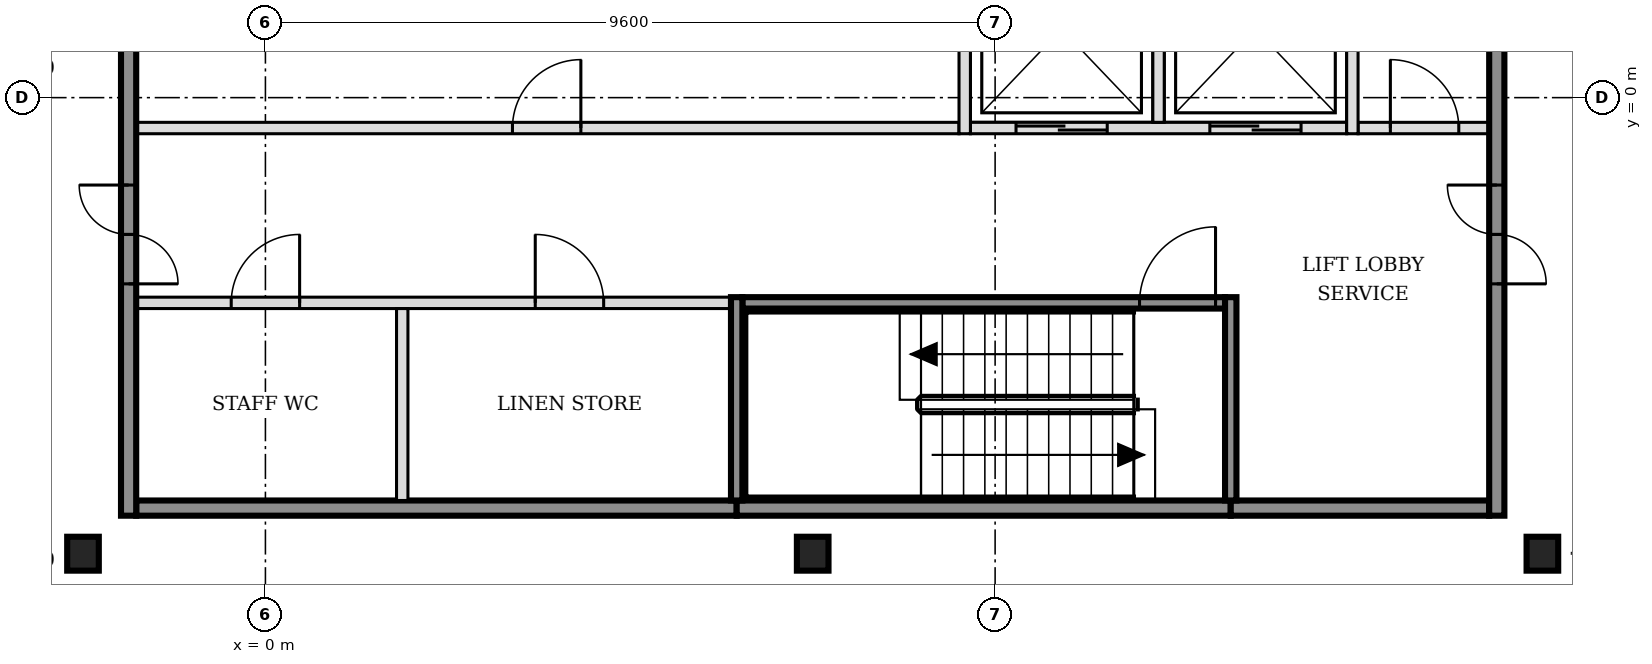
"""IFC4 building model, lengths in metres.
Left out: names, types, materials, properties, quantities, classifications, styles, units other than length and angle.
Written with IfcOpenShell. Run it as: python <this file> out.ifc"""

import sys

from ifc_helpers import new_model, si_unit, direction, frame, frame_2d, origin, origin_2d, place, context, subcontext, project, spatial, rectangle, i_section, extrude, element, fill, save


model = new_model("IFC4")
c1 = context("Model", 3, precision=1e-05, world=origin(), true_north=direction((0.0, 1.0)))
c2 = subcontext(c1, "Body", "Model", "MODEL_VIEW")
j1 = project(units=[si_unit("LENGTHUNIT", "METRE"), si_unit("PLANEANGLEUNIT", "RADIAN")], contexts=[c1])
p1 = place(None, origin())
s1 = spatial("IfcSite", under=j1, at=p1, CompositionType="ELEMENT")
p2 = place(p1, origin())
s2 = spatial("IfcBuilding", under=s1, at=p2, CompositionType="ELEMENT")
p3 = place(p2, frame((0.0, 0.0, 172.2)))
s3 = spatial("IfcBuildingStorey", under=s2, at=p3, CompositionType="ELEMENT", Elevation=172.2)
for number, where, z_axis, x_axis in (
    (1, (-2.4, -6.0, -0.15), (0.0, 0.0, 1.0), (1.0, 0.0, 0.0)),
    (2, (7.2, -6.0, -0.15), (0.0, 0.0, 1.0), (1.0, 0.0, 0.0)),
    (3, (16.8, -6.0, -0.15), (0.0, 0.0, 1.0), (1.0, 0.0, 0.0)),
):
    element("IfcColumn", number, at=place(p3, frame(where, z_axis=z_axis, x_axis=x_axis)), inside=s3, PredefinedType="COLUMN", context=c2, shape_type="SweptSolid", body=[
        extrude(i_section(OverallWidth=0.416, OverallDepth=0.446, WebThickness=0.039, FlangeThickness=0.063, FilletRadius=0.015, at=origin_2d()), origin(), (0.0, 0.0, 1.0), 3.6),
    ])
p4 = place(p3, frame((-1.7, -5.4, 0.0), z_axis=(0.0, 0.0, 1.0), x_axis=(1.0, 0.0, 0.0)))
e4 = element("IfcWall", 4, at=p4, inside=s3, PredefinedType="SOLIDWALL", context=c2, shape_type="SweptSolid", body=[
    extrude(rectangle(XDim=7.9, YDim=0.2, at=frame_2d((3.95, 0.0))), origin(), (0.0, 0.0, 1.0), 3.45),
])
p5 = place(p3, frame((6.2, -5.4, 0.0), z_axis=(0.0, 0.0, 1.0), x_axis=(1.0, 0.0, 0.0)))
e5 = element("IfcWall", 5, at=p5, inside=s3, PredefinedType="SOLIDWALL", context=c2, shape_type="SweptSolid", body=[
    extrude(rectangle(XDim=6.5, YDim=0.2, at=frame_2d((3.25, 0.0))), origin(), (0.0, 0.0, 1.0), 3.45),
])
p6 = place(p3, frame((12.7, -5.4, 0.0), z_axis=(0.0, 0.0, 1.0), x_axis=(1.0, 0.0, 0.0)))
e6 = element("IfcWall", 6, at=p6, inside=s3, PredefinedType="SOLIDWALL", context=c2, shape_type="SweptSolid", body=[
    extrude(rectangle(XDim=3.4, YDim=0.2, at=frame_2d((1.7, 0.0))), origin(), (0.0, 0.0, 1.0), 3.45),
])
p7 = place(p3, frame((-1.7, -2.7, 0.0), z_axis=(0.0, 0.0, 1.0), x_axis=(1.0, 0.0, 0.0)))
e7 = element("IfcWall", 7, at=p7, inside=s3, PredefinedType="PARTITIONING", context=c2, shape_type="SweptSolid", body=[
    extrude(rectangle(XDim=7.825, YDim=0.15, at=frame_2d((3.913, 0.0))), origin(), (0.0, 0.0, 1.0), 3.45),
])
p8 = place(p7, frame((1.25, 0.0, 0.0)))
e8 = element("IfcOpeningElement", 8, at=p8, cuts=e7, PredefinedType="OPENING", context=c2, shape_type="SweptSolid", body=[
    extrude(rectangle(XDim=0.9, YDim=2.1, at=frame_2d((0.45, 1.05))), frame((0.0, 0.085, 0.0), z_axis=(0.0, -1.0, 0.0), x_axis=(1.0, 0.0, 0.0)), (0.0, 0.0, 1.0), 0.17),
])
p9 = place(p7, frame((5.25, 0.0, 0.0)))
e9 = element("IfcOpeningElement", 9, at=p9, cuts=e7, PredefinedType="OPENING", context=c2, shape_type="SweptSolid", body=[
    extrude(rectangle(XDim=0.9, YDim=2.1, at=frame_2d((0.45, 1.05))), frame((0.0, 0.085, 0.0), z_axis=(0.0, -1.0, 0.0), x_axis=(1.0, 0.0, 0.0)), (0.0, 0.0, 1.0), 0.17),
])
p10 = place(p3, frame((6.275, -2.7, 0.0), z_axis=(0.0, 0.0, 1.0), x_axis=(1.0, 0.0, 0.0)))
e10 = element("IfcWall", 10, at=p10, inside=s3, PredefinedType="SOLIDWALL", context=c2, shape_type="SweptSolid", body=[
    extrude(rectangle(XDim=6.35, YDim=0.15, at=frame_2d((3.175, 0.0))), origin(), (0.0, 0.0, 1.0), 3.45),
])
p11 = place(p10, frame((5.225, 0.0, 0.0)))
e11 = element("IfcOpeningElement", 11, at=p11, cuts=e10, PredefinedType="OPENING", context=c2, shape_type="SweptSolid", body=[
    extrude(rectangle(XDim=1.0, YDim=2.1, at=frame_2d((0.5, 1.05))), frame((0.0, 0.085, 0.0), z_axis=(0.0, -1.0, 0.0), x_axis=(1.0, 0.0, 0.0)), (0.0, 0.0, 1.0), 0.17),
])
p12 = place(p3, frame((-1.7, -0.4, 0.0), z_axis=(0.0, 0.0, 1.0), x_axis=(1.0, 0.0, 0.0)))
e12 = element("IfcWall", 12, at=p12, inside=s3, PredefinedType="PARTITIONING", context=c2, shape_type="SweptSolid", body=[
    extrude(rectangle(XDim=10.825, YDim=0.15, at=frame_2d((5.413, 0.0))), origin(), (0.0, 0.0, 1.0), 3.45),
])
p13 = place(p12, frame((4.95, 0.0, 0.0)))
e13 = element("IfcOpeningElement", 13, at=p13, cuts=e12, PredefinedType="OPENING", context=c2, shape_type="SweptSolid", body=[
    extrude(rectangle(XDim=0.9, YDim=2.1, at=frame_2d((0.45, 1.05))), frame((0.0, 0.085, 0.0), z_axis=(0.0, -1.0, 0.0), x_axis=(1.0, 0.0, 0.0)), (0.0, 0.0, 1.0), 0.17),
])
p14 = place(p3, frame((9.275, -0.4, 0.0), z_axis=(0.0, 0.0, 1.0), x_axis=(1.0, 0.0, 0.0)))
e14 = element("IfcWall", 14, at=p14, inside=s3, PredefinedType="SOLIDWALL", context=c2, shape_type="SweptSolid", body=[
    extrude(rectangle(XDim=4.95, YDim=0.15, at=frame_2d((2.475, 0.0))), origin(), (0.0, 0.0, 1.0), 3.45),
])
p15 = place(p14, frame((0.6, 0.0, 0.0)))
e15 = element("IfcOpeningElement", 15, at=p15, cuts=e14, PredefinedType="OPENING", context=c2, shape_type="SweptSolid", body=[
    extrude(rectangle(XDim=1.2, YDim=2.1, at=frame_2d((0.6, 1.05))), frame((0.0, 0.085, 0.0), z_axis=(0.0, -1.0, 0.0), x_axis=(1.0, 0.0, 0.0)), (0.0, 0.0, 1.0), 0.17),
])
p16 = place(p14, frame((3.15, 0.0, 0.0)))
e16 = element("IfcOpeningElement", 16, at=p16, cuts=e14, PredefinedType="OPENING", context=c2, shape_type="SweptSolid", body=[
    extrude(rectangle(XDim=1.2, YDim=2.1, at=frame_2d((0.6, 1.05))), frame((0.0, 0.085, 0.0), z_axis=(0.0, -1.0, 0.0), x_axis=(1.0, 0.0, 0.0)), (0.0, 0.0, 1.0), 0.17),
])
p17 = place(p3, frame((14.375, -0.4, 0.0), z_axis=(0.0, 0.0, 1.0), x_axis=(1.0, 0.0, 0.0)))
e17 = element("IfcWall", 17, at=p17, inside=s3, PredefinedType="PARTITIONING", context=c2, shape_type="SweptSolid", body=[
    extrude(rectangle(XDim=1.725, YDim=0.15, at=frame_2d((0.863, 0.0))), origin(), (0.0, 0.0, 1.0), 3.45),
])
p18 = place(p17, frame((0.425, 0.0, 0.0)))
e18 = element("IfcOpeningElement", 18, at=p18, cuts=e17, PredefinedType="OPENING", context=c2, shape_type="SweptSolid", body=[
    extrude(rectangle(XDim=0.9, YDim=2.1, at=frame_2d((0.45, 1.05))), frame((0.0, 0.085, 0.0), z_axis=(0.0, -1.0, 0.0), x_axis=(1.0, 0.0, 0.0)), (0.0, 0.0, 1.0), 0.17),
])
p19 = place(p3, frame((-1.8, -5.5, 0.0), z_axis=(0.0, 0.0, 1.0), x_axis=(0.0, 1.0, 0.0)))
e19 = element("IfcWall", 19, at=p19, inside=s3, PredefinedType="SOLIDWALL", context=c2, shape_type="SweptSolid", body=[
    extrude(rectangle(XDim=15.8, YDim=0.2, at=frame_2d((7.9, 0.0))), origin(), (0.0, 0.0, 1.0), 3.45),
])
p20 = place(p19, frame((3.05, 0.0, 0.0)))
e20 = element("IfcOpeningElement", 20, at=p20, cuts=e19, PredefinedType="OPENING", context=c2, shape_type="SweptSolid", body=[
    extrude(rectangle(XDim=1.3, YDim=2.1, at=frame_2d((0.65, 1.05))), frame((0.0, 0.11, 0.0), z_axis=(0.0, -1.0, 0.0), x_axis=(1.0, 0.0, 0.0)), (0.0, 0.0, 1.0), 0.22),
])
p21 = place(p19, frame((11.45, 0.0, 0.0)))
e21 = element("IfcOpeningElement", 21, at=p21, cuts=e19, PredefinedType="OPENING", context=c2, shape_type="SweptSolid", body=[
    extrude(rectangle(XDim=1.3, YDim=2.1, at=frame_2d((0.65, 1.05))), frame((0.0, 0.11, 0.0), z_axis=(0.0, -1.0, 0.0), x_axis=(1.0, 0.0, 0.0)), (0.0, 0.0, 1.0), 0.22),
])
p22 = place(p3, frame((1.8, -5.3, 0.0), z_axis=(0.0, 0.0, 1.0), x_axis=(0.0, 1.0, 0.0)))
e22 = element("IfcWall", 22, at=p22, inside=s3, PredefinedType="PARTITIONING", context=c2, shape_type="SweptSolid", body=[
    extrude(rectangle(XDim=2.525, YDim=0.15, at=frame_2d((1.263, 0.0))), origin(), (0.0, 0.0, 1.0), 3.45),
])
p23 = place(p3, frame((6.2, -5.3, 0.0), z_axis=(0.0, 0.0, 1.0), x_axis=(0.0, 1.0, 0.0)))
e23 = element("IfcWall", 23, at=p23, inside=s3, PredefinedType="SOLIDWALL", context=c2, shape_type="SweptSolid", body=[
    extrude(rectangle(XDim=2.675, YDim=0.15, at=frame_2d((1.337, 0.0))), origin(), (0.0, 0.0, 1.0), 3.45),
])
p24 = place(p3, frame((9.2, -0.475, 0.0), z_axis=(0.0, 0.0, 1.0), x_axis=(0.0, 1.0, 0.0)))
e24 = element("IfcWall", 24, at=p24, inside=s3, PredefinedType="SOLIDWALL", context=c2, shape_type="SweptSolid", body=[
    extrude(rectangle(XDim=2.6, YDim=0.15, at=frame_2d((1.3, 0.0))), origin(), (0.0, 0.0, 1.0), 3.45),
])
p25 = place(p3, frame((11.75, -0.325, 0.0), z_axis=(0.0, 0.0, 1.0), x_axis=(0.0, 1.0, 0.0)))
e25 = element("IfcWall", 25, at=p25, inside=s3, PredefinedType="SOLIDWALL", context=c2, shape_type="SweptSolid", body=[
    extrude(rectangle(XDim=2.45, YDim=0.15, at=frame_2d((1.225, 0.0))), origin(), (0.0, 0.0, 1.0), 3.45),
])
p26 = place(p3, frame((12.7, -5.3, 0.0), z_axis=(0.0, 0.0, 1.0), x_axis=(0.0, 1.0, 0.0)))
e26 = element("IfcWall", 26, at=p26, inside=s3, PredefinedType="SOLIDWALL", context=c2, shape_type="SweptSolid", body=[
    extrude(rectangle(XDim=2.675, YDim=0.15, at=frame_2d((1.337, 0.0))), origin(), (0.0, 0.0, 1.0), 3.45),
])
p27 = place(p3, frame((14.3, -0.475, 0.0), z_axis=(0.0, 0.0, 1.0), x_axis=(0.0, 1.0, 0.0)))
e27 = element("IfcWall", 27, at=p27, inside=s3, PredefinedType="SOLIDWALL", context=c2, shape_type="SweptSolid", body=[
    extrude(rectangle(XDim=2.75, YDim=0.15, at=frame_2d((1.375, 0.0))), origin(), (0.0, 0.0, 1.0), 3.45),
])
p28 = place(p3, frame((16.2, -5.5, 0.0), z_axis=(0.0, 0.0, 1.0), x_axis=(0.0, 1.0, 0.0)))
e28 = element("IfcWall", 28, at=p28, inside=s3, PredefinedType="SOLIDWALL", context=c2, shape_type="SweptSolid", body=[
    extrude(rectangle(XDim=15.8, YDim=0.2, at=frame_2d((7.9, 0.0))), origin(), (0.0, 0.0, 1.0), 3.45),
])
p29 = place(p28, frame((3.05, 0.0, 0.0)))
e29 = element("IfcOpeningElement", 29, at=p29, cuts=e28, PredefinedType="OPENING", context=c2, shape_type="SweptSolid", body=[
    extrude(rectangle(XDim=1.3, YDim=2.1, at=frame_2d((0.65, 1.05))), frame((0.0, 0.11, 0.0), z_axis=(0.0, -1.0, 0.0), x_axis=(1.0, 0.0, 0.0)), (0.0, 0.0, 1.0), 0.22),
])
p30 = place(p28, frame((11.45, 0.0, 0.0)))
e30 = element("IfcOpeningElement", 30, at=p30, cuts=e28, PredefinedType="OPENING", context=c2, shape_type="SweptSolid", body=[
    extrude(rectangle(XDim=1.3, YDim=2.1, at=frame_2d((0.65, 1.05))), frame((0.0, 0.11, 0.0), z_axis=(0.0, -1.0, 0.0), x_axis=(1.0, 0.0, 0.0)), (0.0, 0.0, 1.0), 0.22),
])
p31 = place(p15, origin())
e31 = element("IfcDoor", 31, at=p31, inside=s3, OperationType="DOUBLE_DOOR_SLIDING", PredefinedType="DOOR", context=c2, shape_type="SweptSolid", body=[
    extrude(rectangle(XDim=1.2, YDim=2.1, at=frame_2d((0.6, 1.05))), frame((0.0, 0.025, 0.0), z_axis=(0.0, -1.0, 0.0), x_axis=(1.0, 0.0, 0.0)), (0.0, 0.0, 1.0), 0.05),
])
fill(e15, e31)
p32 = place(p16, origin())
e32 = element("IfcDoor", 32, at=p32, inside=s3, OperationType="DOUBLE_DOOR_SLIDING", PredefinedType="DOOR", context=c2, shape_type="SweptSolid", body=[
    extrude(rectangle(XDim=1.2, YDim=2.1, at=frame_2d((0.6, 1.05))), frame((0.0, 0.025, 0.0), z_axis=(0.0, -1.0, 0.0), x_axis=(1.0, 0.0, 0.0)), (0.0, 0.0, 1.0), 0.05),
])
fill(e16, e32)
p33 = place(p11, origin())
e33 = element("IfcDoor", 33, at=p33, inside=s3, OperationType="SINGLE_SWING_RIGHT", PredefinedType="DOOR", context=c2, shape_type="SweptSolid", body=[
    extrude(rectangle(XDim=1.0, YDim=2.1, at=frame_2d((0.5, 1.05))), frame((0.0, 0.025, 0.0), z_axis=(0.0, -1.0, 0.0), x_axis=(1.0, 0.0, 0.0)), (0.0, 0.0, 1.0), 0.05),
])
fill(e11, e33)
p34 = place(p20, origin())
e34 = element("IfcDoor", 34, at=p34, inside=s3, OperationType="DOUBLE_DOOR_SINGLE_SWING", PredefinedType="DOOR", context=c2, shape_type="SweptSolid", body=[
    extrude(rectangle(XDim=1.3, YDim=2.1, at=frame_2d((0.65, 1.05))), frame((0.0, 0.025, 0.0), z_axis=(0.0, -1.0, 0.0), x_axis=(1.0, 0.0, 0.0)), (0.0, 0.0, 1.0), 0.05),
])
fill(e20, e34)
p35 = place(p29, origin())
e35 = element("IfcDoor", 35, at=p35, inside=s3, OperationType="DOUBLE_DOOR_SINGLE_SWING", PredefinedType="DOOR", context=c2, shape_type="SweptSolid", body=[
    extrude(rectangle(XDim=1.3, YDim=2.1, at=frame_2d((0.65, 1.05))), frame((0.0, 0.025, 0.0), z_axis=(0.0, -1.0, 0.0), x_axis=(1.0, 0.0, 0.0)), (0.0, 0.0, 1.0), 0.05),
])
fill(e29, e35)
p36 = place(p18, origin())
e36 = element("IfcDoor", 36, at=p36, inside=s3, OperationType="SINGLE_SWING_LEFT", PredefinedType="DOOR", context=c2, shape_type="SweptSolid", body=[
    extrude(rectangle(XDim=0.9, YDim=2.1, at=frame_2d((0.45, 1.05))), frame((0.0, 0.025, 0.0), z_axis=(0.0, -1.0, 0.0), x_axis=(1.0, 0.0, 0.0)), (0.0, 0.0, 1.0), 0.05),
])
fill(e18, e36)
p37 = place(p8, origin())
e37 = element("IfcDoor", 37, at=p37, inside=s3, OperationType="SINGLE_SWING_RIGHT", PredefinedType="DOOR", context=c2, shape_type="SweptSolid", body=[
    extrude(rectangle(XDim=0.9, YDim=2.1, at=frame_2d((0.45, 1.05))), frame((0.0, 0.025, 0.0), z_axis=(0.0, -1.0, 0.0), x_axis=(1.0, 0.0, 0.0)), (0.0, 0.0, 1.0), 0.05),
])
fill(e8, e37)
p38 = place(p9, origin())
e38 = element("IfcDoor", 38, at=p38, inside=s3, OperationType="SINGLE_SWING_LEFT", PredefinedType="DOOR", context=c2, shape_type="SweptSolid", body=[
    extrude(rectangle(XDim=0.9, YDim=2.1, at=frame_2d((0.45, 1.05))), frame((0.0, 0.025, 0.0), z_axis=(0.0, -1.0, 0.0), x_axis=(1.0, 0.0, 0.0)), (0.0, 0.0, 1.0), 0.05),
])
fill(e9, e38)
p39 = place(p13, origin())
e39 = element("IfcDoor", 39, at=p39, inside=s3, OperationType="SINGLE_SWING_RIGHT", PredefinedType="DOOR", context=c2, shape_type="SweptSolid", body=[
    extrude(rectangle(XDim=0.9, YDim=2.1, at=frame_2d((0.45, 1.05))), frame((0.0, 0.025, 0.0), z_axis=(0.0, -1.0, 0.0), x_axis=(1.0, 0.0, 0.0)), (0.0, 0.0, 1.0), 0.05),
])
fill(e13, e39)
save(model, sys.argv[1])
